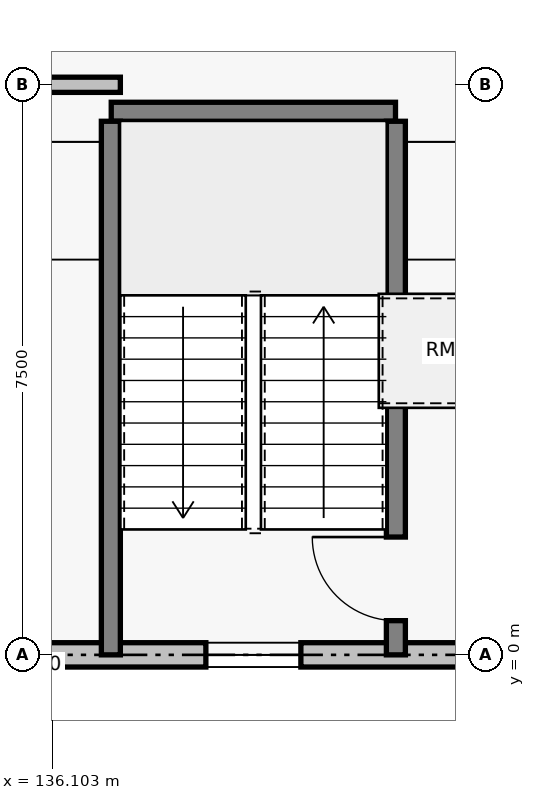
"""IFC4 building model, lengths in metres.
Left out: names, types, materials, properties, quantities, classifications, styles, units other than length and angle.
Written with IfcOpenShell. Run it as: python <this file> out.ifc"""

import sys

from ifc_helpers import new_model, si_unit, direction, frame, frame_2d, origin, place, context, subcontext, project, spatial, rectangle, extrude, element, fill, save


model = new_model("IFC4")
c1 = context("Model", 3, precision=1e-05, world=origin(), true_north=direction((0.0, 1.0)))
c2 = subcontext(c1, "Body", "Model", "MODEL_VIEW")
j1 = project(units=[si_unit("LENGTHUNIT", "METRE"), si_unit("PLANEANGLEUNIT", "RADIAN")], contexts=[c1])
p1 = place(None, origin())
s1 = spatial("IfcSite", under=j1, at=p1, CompositionType="ELEMENT")
p2 = place(p1, origin())
s2 = spatial("IfcBuilding", under=s1, at=p2, CompositionType="ELEMENT")
p3 = place(p2, frame((0.0, 0.0, 4.8)))
s3 = spatial("IfcBuildingStorey", under=s2, at=p3, CompositionType="ELEMENT", Elevation=4.8)
p4 = place(p3, frame((135.325, 0.0, 0.0), z_axis=(0.0, 0.0, 1.0), x_axis=(1.0, 0.0, 0.0)))
e1 = element("IfcWall", 1, at=p4, inside=s3, PredefinedType="SOLIDWALL", context=c2, shape_type="SweptSolid", body=[
    extrude(rectangle(XDim=6.85, YDim=0.32, at=frame_2d((3.425, 0.0))), origin(), (0.0, 0.0, 1.0), 3.14),
])
p5 = place(p4, frame((2.8, 0.0, 0.6)))
e2 = element("IfcOpeningElement", 2, at=p5, cuts=e1, PredefinedType="OPENING", context=c2, shape_type="SweptSolid", body=[
    extrude(rectangle(XDim=1.25, YDim=1.8, at=frame_2d((0.625, 0.9))), frame((0.0, 0.17, 0.0), z_axis=(0.0, -1.0, 0.0), x_axis=(1.0, 0.0, 0.0)), (0.0, 0.0, 1.0), 0.34),
])
p6 = place(p3, frame((136.88, 7.145, 0.0), z_axis=(0.0, 0.0, 1.0), x_axis=(1.0, 0.0, 0.0)))
e3 = element("IfcWall", 3, at=p6, inside=s3, PredefinedType="SOLIDWALL", context=c2, shape_type="SweptSolid", body=[
    extrude(rectangle(XDim=3.74, YDim=0.25, at=frame_2d((1.87, 0.0))), origin(), (0.0, 0.0, 1.0), 3.92),
])
p7 = place(p3, frame((136.875, 0.0, 0.0), z_axis=(0.0, 0.0, 1.0), x_axis=(0.0, 1.0, 0.0)))
e4 = element("IfcWall", 4, at=p7, inside=s3, PredefinedType="SOLIDWALL", context=c2, shape_type="SweptSolid", body=[
    extrude(rectangle(XDim=7.02, YDim=0.25, at=frame_2d((3.51, 0.0))), origin(), (0.0, 0.0, 1.0), 3.92),
])
p8 = place(p3, frame((140.625, 0.0, 0.0), z_axis=(0.0, 0.0, 1.0), x_axis=(0.0, 1.0, 0.0)))
e5 = element("IfcWall", 5, at=p8, inside=s3, PredefinedType="SOLIDWALL", context=c2, shape_type="SweptSolid", body=[
    extrude(rectangle(XDim=7.02, YDim=0.25, at=frame_2d((3.51, 0.0))), origin(), (0.0, 0.0, 1.0), 3.92),
])
p9 = place(p8, frame((0.45, 0.0, 0.0)))
e6 = element("IfcOpeningElement", 6, at=p9, cuts=e5, PredefinedType="OPENING", context=c2, shape_type="SweptSolid", body=[
    extrude(rectangle(XDim=1.1, YDim=2.15, at=frame_2d((0.55, 1.075))), frame((0.0, 0.135, 0.0), z_axis=(0.0, -1.0, 0.0), x_axis=(1.0, 0.0, 0.0)), (0.0, 0.0, 1.0), 0.27),
])
p10 = place(p3, frame((135.324, 7.5, 0.0), z_axis=(0.0, 0.0, 1.0), x_axis=(1.0, 0.0, 0.0)))
e7 = element("IfcWall", 7, at=p10, inside=s3, PredefinedType="PARTITIONING", context=c2, shape_type="SweptSolid", body=[
    extrude(rectangle(XDim=1.676, YDim=0.2, at=frame_2d((0.838, 0.0))), origin(), (0.0, 0.0, 1.0), 2.99),
])
p11 = place(p5, origin())
e8 = element("IfcWindow", 8, at=p11, inside=s3, PartitioningType="SINGLE_PANEL", PredefinedType="WINDOW", context=c2, shape_type="SweptSolid", body=[
    extrude(rectangle(XDim=1.25, YDim=1.8, at=frame_2d((0.625, 0.9))), frame((0.0, 0.03, 0.0), z_axis=(0.0, -1.0, 0.0), x_axis=(1.0, 0.0, 0.0)), (0.0, 0.0, 1.0), 0.06),
])
fill(e2, e8)
p12 = place(p9, origin())
e9 = element("IfcDoor", 9, at=p12, inside=s3, OperationType="SINGLE_SWING_RIGHT", PredefinedType="DOOR", context=c2, shape_type="SweptSolid", body=[
    extrude(rectangle(XDim=1.1, YDim=2.15, at=frame_2d((0.55, 1.075))), frame((0.0, 0.025, 0.0), z_axis=(0.0, -1.0, 0.0), x_axis=(1.0, 0.0, 0.0)), (0.0, 0.0, 1.0), 0.05),
])
fill(e6, e9)
save(model, sys.argv[1])
